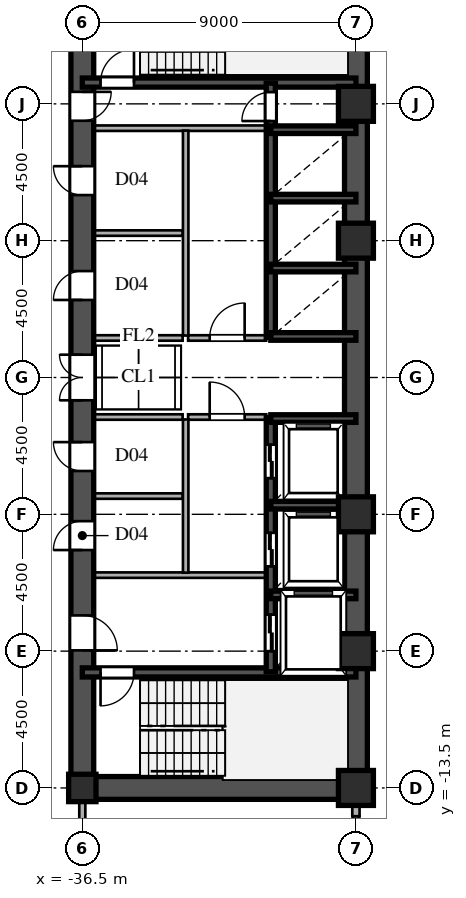
"""IFC4 building model, lengths in metres.
Left out: names, types, materials, properties, quantities, classifications, styles, units other than length and angle.
Written with IfcOpenShell. Run it as: python <this file> out.ifc"""

import sys

from ifc_helpers import new_model, si_unit, direction, frame, frame_2d, origin, origin_2d, place, context, subcontext, project, spatial, rectangle, hollow_rectangle, i_section, extrude, source, transform, mapped, element, fill, save


model = new_model("IFC4")
c1 = context("Model", 3, precision=1e-05, world=origin(), true_north=direction((0.0, 1.0)))
c2 = subcontext(c1, "Body", "Model", "MODEL_VIEW")
j1 = project(units=[si_unit("LENGTHUNIT", "METRE"), si_unit("PLANEANGLEUNIT", "RADIAN")], contexts=[c1])
p1 = place(None, origin())
s1 = spatial("IfcSite", under=j1, at=p1, CompositionType="ELEMENT")
p2 = place(p1, origin())
s2 = spatial("IfcBuilding", under=s1, at=p2, CompositionType="ELEMENT")
p3 = place(p2, frame((0.0, 0.0, 51.3)))
s3 = spatial("IfcBuildingStorey", under=s2, at=p3, CompositionType="ELEMENT", Elevation=51.3)
m1 = source(origin(), c2, "Body", "SweptSolid", [
    extrude(hollow_rectangle(XDim=1.15, YDim=1.15, WallThickness=0.048, at=origin_2d()), origin(), (0.0, 0.0, 1.0), 3.6),
])
for number, where, z_axis, x_axis in (
    (1, (-27.5, -13.5, 0.0), (0.0, 0.0, 1.0), (1.0, 0.0, 0.0)),
    (2, (-27.5, -9.0, 0.0), (0.0, 0.0, 1.0), (1.0, 0.0, 0.0)),
    (3, (-27.5, -4.5, 0.0), (0.0, 0.0, 1.0), (1.0, 0.0, 0.0)),
    (4, (-27.5, 4.5, 0.0), (0.0, 0.0, 1.0), (1.0, 0.0, 0.0)),
    (5, (-27.5, 9.0, 0.0), (0.0, 0.0, 1.0), (1.0, 0.0, 0.0)),
):
    element("IfcColumn", number, at=place(p3, frame(where, z_axis=z_axis, x_axis=x_axis)), inside=s3, PredefinedType="COLUMN", context=c2, shape_type="MappedRepresentation", body=[
        mapped(m1, transform((0.0, 0.0, 0.0), scale=1.0)),
    ])
m2 = source(origin(), c2, "Body", "SweptSolid", [
    extrude(i_section(OverallWidth=0.9, OverallDepth=0.9, WebThickness=0.036, FlangeThickness=0.055, at=origin_2d()), origin(), (0.0, 0.0, 1.0), 3.6),
])
p4 = place(p3, frame((-36.5, -13.5, 0.0), z_axis=(0.0, 0.0, 1.0), x_axis=(1.0, 0.0, 0.0)))
e6 = element("IfcColumn", 6, at=p4, inside=s3, PredefinedType="COLUMN", context=c2, shape_type="MappedRepresentation", body=[
    mapped(m2, transform((0.0, 0.0, 0.0), scale=1.0)),
])
p5 = place(p3, frame((-27.5, -14.43, 0.0), z_axis=(0.0, 0.0, 1.0), x_axis=(0.0, 1.0, 0.0)))
e7 = element("IfcWall", 7, at=p5, inside=s3, PredefinedType="SOLIDWALL", context=c2, shape_type="SweptSolid", body=[
    extrude(rectangle(XDim=0.55, YDim=0.24, at=frame_2d((0.275, 0.0))), origin(), (0.0, 0.0, 1.0), 2.88),
])
for number, where, z_axis, x_axis in (
    (8, (-27.5, -13.5, 0.0), (0.0, 0.0, 1.0), (0.0, 1.0, 0.0)),
    (9, (-27.5, 1.3, 0.0), (0.0, 0.0, 1.0), (0.0, 1.0, 0.0)),
):
    element("IfcWall", number, at=place(p3, frame(where, z_axis=z_axis, x_axis=x_axis)), inside=s3, PredefinedType="SHEAR", context=c2, shape_type="SweptSolid", body=[
        extrude(rectangle(XDim=12.2, YDim=0.75, at=frame_2d((6.1, 0.0))), origin(), (0.0, 0.0, 1.0), 3.38),
    ])
p6 = place(p3, frame((-27.5, -1.3, 0.0), z_axis=(0.0, 0.0, 1.0), x_axis=(0.0, 1.0, 0.0)))
e10 = element("IfcWall", 10, at=p6, inside=s3, PredefinedType="SHEAR", context=c2, shape_type="SweptSolid", body=[
    extrude(rectangle(XDim=2.6, YDim=0.75, at=frame_2d((1.3, 0.0))), origin(), (0.0, 0.0, 1.0), 3.38),
])
p7 = place(p3, frame((-36.5, -13.5, 0.0), z_axis=(0.0, 0.0, 1.0), x_axis=(1.0, 0.0, 0.0)))
e11 = element("IfcWall", 11, at=p7, inside=s3, PredefinedType="SHEAR", context=c2, shape_type="SweptSolid", body=[
    extrude(rectangle(XDim=9.0, YDim=0.75, at=frame_2d((4.5, 0.0))), origin(), (0.0, 0.0, 1.0), 3.38),
])
p8 = place(p3, frame((-36.5, -13.65, 0.0), z_axis=(0.0, 0.0, 1.0), x_axis=(0.0, 1.0, 0.0)))
e12 = element("IfcWall", 12, at=p8, inside=s3, PredefinedType="SHEAR", context=c2, shape_type="SweptSolid", body=[
    extrude(rectangle(XDim=7.15, YDim=0.75, at=frame_2d((3.575, 0.0))), origin(), (0.0, 0.0, 1.0), 3.38),
])
p9 = place(p8, frame((4.675, 0.0, 0.0)))
e13 = element("IfcOpeningElement", 13, at=p9, cuts=e12, PredefinedType="OPENING", context=c2, shape_type="SweptSolid", body=[
    extrude(rectangle(XDim=1.15, YDim=2.2, at=frame_2d((0.575, 1.1))), frame((0.0, 0.385, 0.0), z_axis=(0.0, -1.0, 0.0), x_axis=(1.0, 0.0, 0.0)), (0.0, 0.0, 1.0), 0.77),
])
p10 = place(p3, frame((-36.5, -1.3, 0.0), z_axis=(0.0, 0.0, 1.0), x_axis=(0.0, 1.0, 0.0)))
e14 = element("IfcWall", 14, at=p10, inside=s3, PredefinedType="SHEAR", context=c2, shape_type="SweptSolid", body=[
    extrude(rectangle(XDim=2.6, YDim=0.75, at=frame_2d((1.3, 0.0))), origin(), (0.0, 0.0, 1.0), 3.38),
])
p11 = place(p10, frame((0.55, 0.0, 0.0)))
e15 = element("IfcOpeningElement", 15, at=p11, cuts=e14, PredefinedType="OPENING", context=c2, shape_type="SweptSolid", body=[
    extrude(rectangle(XDim=1.5, YDim=2.3, at=frame_2d((0.75, 1.15))), frame((0.0, 0.385, 0.0), z_axis=(0.0, -1.0, 0.0), x_axis=(1.0, 0.0, 0.0)), (0.0, 0.0, 1.0), 0.77),
])
p12 = place(p3, frame((-36.5, 8.2, 0.0), z_axis=(0.0, 0.0, 1.0), x_axis=(0.0, 1.0, 0.0)))
e16 = element("IfcWall", 16, at=p12, inside=s3, PredefinedType="SHEAR", context=c2, shape_type="SweptSolid", body=[
    extrude(rectangle(XDim=5.45, YDim=0.75, at=frame_2d((2.725, 0.0))), origin(), (0.0, 0.0, 1.0), 3.38),
])
p13 = place(p12, frame((0.245, 0.0, 0.0)))
e17 = element("IfcOpeningElement", 17, at=p13, cuts=e16, PredefinedType="OPENING", context=c2, shape_type="SweptSolid", body=[
    extrude(rectangle(XDim=0.95, YDim=2.15, at=frame_2d((0.475, 1.075))), frame((0.0, 0.385, 0.0), z_axis=(0.0, -1.0, 0.0), x_axis=(1.0, 0.0, 0.0)), (0.0, 0.0, 1.0), 0.77),
])
p14 = place(p3, frame((-36.5, -6.5, 0.0), z_axis=(0.0, 0.0, 1.0), x_axis=(0.0, 1.0, 0.0)))
e18 = element("IfcWall", 18, at=p14, inside=s3, PredefinedType="SHEAR", context=c2, shape_type="SweptSolid", body=[
    extrude(rectangle(XDim=2.6, YDim=0.75, at=frame_2d((1.3, 0.0))), origin(), (0.0, 0.0, 1.0), 3.38),
])
p15 = place(p14, frame((0.825, 0.0, 0.0)))
e19 = element("IfcOpeningElement", 19, at=p15, cuts=e18, PredefinedType="OPENING", context=c2, shape_type="SweptSolid", body=[
    extrude(rectangle(XDim=0.95, YDim=2.15, at=frame_2d((0.475, 1.075))), frame((0.0, 0.385, 0.0), z_axis=(0.0, -1.0, 0.0), x_axis=(1.0, 0.0, 0.0)), (0.0, 0.0, 1.0), 0.77),
])
p16 = place(p3, frame((-36.5, -3.9, 0.0), z_axis=(0.0, 0.0, 1.0), x_axis=(0.0, 1.0, 0.0)))
e20 = element("IfcWall", 20, at=p16, inside=s3, PredefinedType="SHEAR", context=c2, shape_type="SweptSolid", body=[
    extrude(rectangle(XDim=2.6, YDim=0.75, at=frame_2d((1.3, 0.0))), origin(), (0.0, 0.0, 1.0), 3.38),
])
p17 = place(p16, frame((0.825, 0.0, 0.0)))
e21 = element("IfcOpeningElement", 21, at=p17, cuts=e20, PredefinedType="OPENING", context=c2, shape_type="SweptSolid", body=[
    extrude(rectangle(XDim=0.95, YDim=2.15, at=frame_2d((0.475, 1.075))), frame((0.0, 0.385, 0.0), z_axis=(0.0, -1.0, 0.0), x_axis=(1.0, 0.0, 0.0)), (0.0, 0.0, 1.0), 0.77),
])
p18 = place(p3, frame((-36.5, 1.3, 0.0), z_axis=(0.0, 0.0, 1.0), x_axis=(0.0, 1.0, 0.0)))
e22 = element("IfcWall", 22, at=p18, inside=s3, PredefinedType="SHEAR", context=c2, shape_type="SweptSolid", body=[
    extrude(rectangle(XDim=3.45, YDim=0.75, at=frame_2d((1.725, 0.0))), origin(), (0.0, 0.0, 1.0), 3.38),
])
p19 = place(p18, frame((1.25, 0.0, 0.0)))
e23 = element("IfcOpeningElement", 23, at=p19, cuts=e22, PredefinedType="OPENING", context=c2, shape_type="SweptSolid", body=[
    extrude(rectangle(XDim=0.95, YDim=2.15, at=frame_2d((0.475, 1.075))), frame((0.0, 0.385, 0.0), z_axis=(0.0, -1.0, 0.0), x_axis=(1.0, 0.0, 0.0)), (0.0, 0.0, 1.0), 0.77),
])
p20 = place(p3, frame((-36.5, 4.75, 0.0), z_axis=(0.0, 0.0, 1.0), x_axis=(0.0, 1.0, 0.0)))
e24 = element("IfcWall", 24, at=p20, inside=s3, PredefinedType="SHEAR", context=c2, shape_type="SweptSolid", body=[
    extrude(rectangle(XDim=3.45, YDim=0.75, at=frame_2d((1.725, 0.0))), origin(), (0.0, 0.0, 1.0), 3.38),
])
p21 = place(p20, frame((1.25, 0.0, 0.0)))
e25 = element("IfcOpeningElement", 25, at=p21, cuts=e24, PredefinedType="OPENING", context=c2, shape_type="SweptSolid", body=[
    extrude(rectangle(XDim=0.95, YDim=2.15, at=frame_2d((0.475, 1.075))), frame((0.0, 0.385, 0.0), z_axis=(0.0, -1.0, 0.0), x_axis=(1.0, 0.0, 0.0)), (0.0, 0.0, 1.0), 0.77),
])
p22 = place(p3, frame((-36.5, -9.7, 0.0), z_axis=(0.0, 0.0, 1.0), x_axis=(1.0, 0.0, 0.0)))
e26 = element("IfcWall", 26, at=p22, inside=s3, PredefinedType="SHEAR", context=c2, shape_type="SweptSolid", body=[
    extrude(rectangle(XDim=9.0, YDim=0.3, at=frame_2d((4.5, 0.0))), origin(), (0.0, 0.0, 1.0), 3.38),
])
p23 = place(p22, frame((0.6, 0.0, 0.0)))
e27 = element("IfcOpeningElement", 27, at=p23, cuts=e26, PredefinedType="OPENING", context=c2, shape_type="SweptSolid", body=[
    extrude(rectangle(XDim=1.1, YDim=2.2, at=frame_2d((0.55, 1.1))), frame((0.0, 0.16, 0.0), z_axis=(0.0, -1.0, 0.0), x_axis=(1.0, 0.0, 0.0)), (0.0, 0.0, 1.0), 0.32),
])
p24 = place(p3, frame((-36.5, 9.7, 0.0), z_axis=(0.0, 0.0, 1.0), x_axis=(1.0, 0.0, 0.0)))
e28 = element("IfcWall", 28, at=p24, inside=s3, PredefinedType="SHEAR", context=c2, shape_type="SweptSolid", body=[
    extrude(rectangle(XDim=9.0, YDim=0.3, at=frame_2d((4.5, 0.0))), origin(), (0.0, 0.0, 1.0), 3.38),
])
p25 = place(p24, frame((0.6, 0.0, 0.0)))
e29 = element("IfcOpeningElement", 29, at=p25, cuts=e28, PredefinedType="OPENING", context=c2, shape_type="SweptSolid", body=[
    extrude(rectangle(XDim=1.1, YDim=2.2, at=frame_2d((0.55, 1.1))), frame((0.0, 0.16, 0.0), z_axis=(0.0, -1.0, 0.0), x_axis=(1.0, 0.0, 0.0)), (0.0, 0.0, 1.0), 0.32),
])
for number, where, z_axis, x_axis in (
    (30, (-30.3, -7.15, 0.0), (0.0, 0.0, 1.0), (1.0, 0.0, 0.0)),
    (31, (-30.3, -4.2, 0.0), (0.0, 0.0, 1.0), (1.0, 0.0, 0.0)),
    (32, (-30.3, -1.35, 0.0), (0.0, 0.0, 1.0), (1.0, 0.0, 0.0)),
    (33, (-30.3, 1.35, 0.0), (0.0, 0.0, 1.0), (1.0, 0.0, 0.0)),
    (34, (-30.3, 3.6, 0.0), (0.0, 0.0, 1.0), (1.0, 0.0, 0.0)),
    (35, (-30.3, 5.9, 0.0), (0.0, 0.0, 1.0), (1.0, 0.0, 0.0)),
    (36, (-30.3, 8.15, 0.0), (0.0, 0.0, 1.0), (1.0, 0.0, 0.0)),
):
    element("IfcWall", number, at=place(p3, frame(where, z_axis=z_axis, x_axis=x_axis)), inside=s3, PredefinedType="SHEAR", context=c2, shape_type="SweptSolid", body=[
        extrude(rectangle(XDim=2.8, YDim=0.25, at=frame_2d((1.4, 0.0))), origin(), (0.0, 0.0, 1.0), 3.38),
    ])
p26 = place(p3, frame((-30.3, -9.68, 0.0), z_axis=(0.0, 0.0, 1.0), x_axis=(0.0, 1.0, 0.0)))
e37 = element("IfcWall", 37, at=p26, inside=s3, PredefinedType="SHEAR", context=c2, shape_type="SweptSolid", body=[
    extrude(rectangle(XDim=2.56, YDim=0.3, at=frame_2d((1.28, 0.0))), origin(), (0.0, 0.0, 1.0), 3.38),
])
p27 = place(p26, frame((0.68, 0.0, 0.0)))
e38 = element("IfcOpeningElement", 38, at=p27, cuts=e37, PredefinedType="OPENING", context=c2, shape_type="SweptSolid", body=[
    extrude(rectangle(XDim=1.2, YDim=2.25, at=frame_2d((0.6, 1.125))), frame((0.0, 0.16, 0.0), z_axis=(0.0, -1.0, 0.0), x_axis=(1.0, 0.0, 0.0)), (0.0, 0.0, 1.0), 0.32),
])
p28 = place(p3, frame((-30.3, -7.12, 0.0), z_axis=(0.0, 0.0, 1.0), x_axis=(0.0, 1.0, 0.0)))
e39 = element("IfcWall", 39, at=p28, inside=s3, PredefinedType="SHEAR", context=c2, shape_type="SweptSolid", body=[
    extrude(rectangle(XDim=2.92, YDim=0.3, at=frame_2d((1.46, 0.0))), origin(), (0.0, 0.0, 1.0), 3.38),
])
p29 = place(p28, frame((0.91, 0.0, 0.0)))
e40 = element("IfcOpeningElement", 40, at=p29, cuts=e39, PredefinedType="OPENING", context=c2, shape_type="SweptSolid", body=[
    extrude(rectangle(XDim=1.1, YDim=2.2, at=frame_2d((0.55, 1.1))), frame((0.0, 0.16, 0.0), z_axis=(0.0, -1.0, 0.0), x_axis=(1.0, 0.0, 0.0)), (0.0, 0.0, 1.0), 0.32),
])
p30 = place(p3, frame((-30.3, -4.2, 0.0), z_axis=(0.0, 0.0, 1.0), x_axis=(0.0, 1.0, 0.0)))
e41 = element("IfcWall", 41, at=p30, inside=s3, PredefinedType="SHEAR", context=c2, shape_type="SweptSolid", body=[
    extrude(rectangle(XDim=2.88, YDim=0.3, at=frame_2d((1.44, 0.0))), origin(), (0.0, 0.0, 1.0), 3.38),
])
p31 = place(p30, frame((0.89, 0.0, 0.0)))
e42 = element("IfcOpeningElement", 42, at=p31, cuts=e41, PredefinedType="OPENING", context=c2, shape_type="SweptSolid", body=[
    extrude(rectangle(XDim=1.1, YDim=2.2, at=frame_2d((0.55, 1.1))), frame((0.0, 0.16, 0.0), z_axis=(0.0, -1.0, 0.0), x_axis=(1.0, 0.0, 0.0)), (0.0, 0.0, 1.0), 0.32),
])
p32 = place(p3, frame((-30.3, 1.32, 0.0), z_axis=(0.0, 0.0, 1.0), x_axis=(0.0, 1.0, 0.0)))
e43 = element("IfcWall", 43, at=p32, inside=s3, PredefinedType="SHEAR", context=c2, shape_type="SweptSolid", body=[
    extrude(rectangle(XDim=2.28, YDim=0.3, at=frame_2d((1.14, 0.0))), origin(), (0.0, 0.0, 1.0), 3.38),
])
p33 = place(p3, frame((-30.3, 3.6, 0.0), z_axis=(0.0, 0.0, 1.0), x_axis=(0.0, 1.0, 0.0)))
e44 = element("IfcWall", 44, at=p33, inside=s3, PredefinedType="SHEAR", context=c2, shape_type="SweptSolid", body=[
    extrude(rectangle(XDim=2.3, YDim=0.3, at=frame_2d((1.15, 0.0))), origin(), (0.0, 0.0, 1.0), 3.38),
])
p34 = place(p3, frame((-30.3, 5.9, 0.0), z_axis=(0.0, 0.0, 1.0), x_axis=(0.0, 1.0, 0.0)))
e45 = element("IfcWall", 45, at=p34, inside=s3, PredefinedType="SHEAR", context=c2, shape_type="SweptSolid", body=[
    extrude(rectangle(XDim=2.25, YDim=0.3, at=frame_2d((1.125, 0.0))), origin(), (0.0, 0.0, 1.0), 3.38),
])
p35 = place(p3, frame((-30.3, 8.15, 0.0), z_axis=(0.0, 0.0, 1.0), x_axis=(0.0, 1.0, 0.0)))
e46 = element("IfcWall", 46, at=p35, inside=s3, PredefinedType="SHEAR", context=c2, shape_type="SweptSolid", body=[
    extrude(rectangle(XDim=1.53, YDim=0.3, at=frame_2d((0.765, 0.0))), origin(), (0.0, 0.0, 1.0), 3.38),
])
p36 = place(p35, frame((0.285, 0.0, 0.0)))
e47 = element("IfcOpeningElement", 47, at=p36, cuts=e46, PredefinedType="OPENING", context=c2, shape_type="SweptSolid", body=[
    extrude(rectangle(XDim=0.95, YDim=2.15, at=frame_2d((0.475, 1.075))), frame((0.0, 0.16, 0.0), z_axis=(0.0, -1.0, 0.0), x_axis=(1.0, 0.0, 0.0)), (0.0, 0.0, 1.0), 0.32),
])
for number, where, z_axis, x_axis in (
    (48, (-36.15, -6.5, 0.0), (0.0, 0.0, 1.0), (1.0, 0.0, 0.0)),
    (49, (-36.15, 8.2, 0.0), (0.0, 0.0, 1.0), (1.0, 0.0, 0.0)),
):
    element("IfcWall", number, at=place(p3, frame(where, z_axis=z_axis, x_axis=x_axis)), inside=s3, PredefinedType="PARTITIONING", context=c2, shape_type="SweptSolid", body=[
        extrude(rectangle(XDim=5.7, YDim=0.18, at=frame_2d((2.85, 0.0))), origin(), (0.0, 0.0, 1.0), 3.38),
    ])
p37 = place(p3, frame((-33.1, -6.42, 0.0), z_axis=(0.0, 0.0, 1.0), x_axis=(0.0, 1.0, 0.0)))
e50 = element("IfcWall", 50, at=p37, inside=s3, PredefinedType="PARTITIONING", context=c2, shape_type="SweptSolid", body=[
    extrude(rectangle(XDim=5.04, YDim=0.18, at=frame_2d((2.52, 0.0))), origin(), (0.0, 0.0, 1.0), 3.38),
])
p38 = place(p3, frame((-33.1, 1.38, 0.0), z_axis=(0.0, 0.0, 1.0), x_axis=(0.0, 1.0, 0.0)))
e51 = element("IfcWall", 51, at=p38, inside=s3, PredefinedType="PARTITIONING", context=c2, shape_type="SweptSolid", body=[
    extrude(rectangle(XDim=6.74, YDim=0.18, at=frame_2d((3.37, 0.0))), origin(), (0.0, 0.0, 1.0), 3.38),
])
p39 = place(p3, frame((-33.02, -1.3, 0.0), z_axis=(0.0, 0.0, 1.0), x_axis=(1.0, 0.0, 0.0)))
e52 = element("IfcWall", 52, at=p39, inside=s3, PredefinedType="PARTITIONING", context=c2, shape_type="SweptSolid", body=[
    extrude(rectangle(XDim=2.57, YDim=0.18, at=frame_2d((1.285, 0.0))), origin(), (0.0, 0.0, 1.0), 3.38),
])
p40 = place(p39, frame((0.71, 0.0, 0.0)))
e53 = element("IfcOpeningElement", 53, at=p40, cuts=e52, PredefinedType="OPENING", context=c2, shape_type="SweptSolid", body=[
    extrude(rectangle(XDim=1.15, YDim=2.2, at=frame_2d((0.575, 1.1))), frame((0.0, 0.1, 0.0), z_axis=(0.0, -1.0, 0.0), x_axis=(1.0, 0.0, 0.0)), (0.0, 0.0, 1.0), 0.2),
])
p41 = place(p3, frame((-33.02, 1.3, 0.0), z_axis=(0.0, 0.0, 1.0), x_axis=(1.0, 0.0, 0.0)))
e54 = element("IfcWall", 54, at=p41, inside=s3, PredefinedType="PARTITIONING", context=c2, shape_type="SweptSolid", body=[
    extrude(rectangle(XDim=2.57, YDim=0.18, at=frame_2d((1.285, 0.0))), origin(), (0.0, 0.0, 1.0), 3.38),
])
p42 = place(p41, frame((0.71, 0.0, 0.0)))
e55 = element("IfcOpeningElement", 55, at=p42, cuts=e54, PredefinedType="OPENING", context=c2, shape_type="SweptSolid", body=[
    extrude(rectangle(XDim=1.15, YDim=2.2, at=frame_2d((0.575, 1.1))), frame((0.0, 0.1, 0.0), z_axis=(0.0, -1.0, 0.0), x_axis=(1.0, 0.0, 0.0)), (0.0, 0.0, 1.0), 0.2),
])
for number, where, z_axis, x_axis in (
    (56, (-36.15, -1.3, 0.0), (0.0, 0.0, 1.0), (1.0, 0.0, 0.0)),
    (57, (-36.15, 1.3, 0.0), (0.0, 0.0, 1.0), (1.0, 0.0, 0.0)),
    (58, (-36.15, -3.9, 0.0), (0.0, 0.0, 1.0), (1.0, 0.0, 0.0)),
    (59, (-36.15, 4.75, 0.0), (0.0, 0.0, 1.0), (1.0, 0.0, 0.0)),
):
    element("IfcWall", number, at=place(p3, frame(where, z_axis=z_axis, x_axis=x_axis)), inside=s3, PredefinedType="PARTITIONING", context=c2, shape_type="SweptSolid", body=[
        extrude(rectangle(XDim=2.95, YDim=0.18, at=frame_2d((1.475, 0.0))), origin(), (0.0, 0.0, 1.0), 3.38),
    ])
p43 = place(p3, frame((-36.5, -15.515, 0.0), z_axis=(0.0, 0.0, 1.0), x_axis=(0.0, 1.0, 0.0)))
e60 = element("IfcWall", 60, at=p43, inside=s3, PredefinedType="PARTITIONING", context=c2, shape_type="SweptSolid", body=[
    extrude(rectangle(XDim=1.635, YDim=0.2, at=frame_2d((0.817, 0.0))), origin(), (0.0, 0.0, 1.0), 2.68),
])
m3 = source(origin(), c2, "Body", "SweptSolid", [
    extrude(rectangle(XDim=1.15, YDim=2.2, at=frame_2d((0.575, 1.1))), frame((0.0, 0.025, 0.0), z_axis=(0.0, -1.0, 0.0), x_axis=(1.0, 0.0, 0.0)), (0.0, 0.0, 1.0), 0.05),
])
p44 = place(p9, frame((1.15, 0.0, 0.0), z_axis=(0.0, 0.0, 1.0), x_axis=(-1.0, 0.0, 0.0)))
e61 = element("IfcDoor", 61, at=p44, inside=s3, OperationType="SINGLE_SWING_LEFT", PredefinedType="DOOR", context=c2, shape_type="MappedRepresentation", body=[
    mapped(m3, transform((0.0, 0.0, 0.0), scale=1.0)),
])
fill(e13, e61)
m4 = source(origin(), c2, "Body", "SweptSolid", [
    extrude(rectangle(XDim=1.5, YDim=2.3, at=frame_2d((0.75, 1.15))), frame((0.0, 0.025, 0.0), z_axis=(0.0, -1.0, 0.0), x_axis=(1.0, 0.0, 0.0)), (0.0, 0.0, 1.0), 0.05),
])
p45 = place(p11, origin())
e62 = element("IfcDoor", 62, at=p45, inside=s3, OperationType="DOUBLE_SWING_LEFT", PredefinedType="DOOR", context=c2, shape_type="MappedRepresentation", body=[
    mapped(m4, transform((0.0, 0.0, 0.0), scale=1.0)),
])
fill(e15, e62)
m5 = source(origin(), c2, "Body", "SweptSolid", [
    extrude(rectangle(XDim=0.95, YDim=2.15, at=frame_2d((0.475, 1.075))), frame((0.0, 0.025, 0.0), z_axis=(0.0, -1.0, 0.0), x_axis=(1.0, 0.0, 0.0)), (0.0, 0.0, 1.0), 0.05),
])
p46 = place(p13, frame((0.95, 0.0, 0.0), z_axis=(0.0, 0.0, 1.0), x_axis=(-1.0, 0.0, 0.0)))
e63 = element("IfcDoor", 63, at=p46, inside=s3, OperationType="SINGLE_SWING_RIGHT", PredefinedType="DOOR", context=c2, shape_type="MappedRepresentation", body=[
    mapped(m5, transform((0.0, 0.0, 0.0), scale=1.0)),
])
fill(e17, e63)
p47 = place(p15, origin())
e64 = element("IfcDoor", 64, at=p47, inside=s3, OperationType="SINGLE_SWING_LEFT", PredefinedType="DOOR", context=c2, shape_type="MappedRepresentation", body=[
    mapped(m5, transform((0.0, 0.0, 0.0), scale=1.0)),
])
fill(e19, e64)
p48 = place(p17, origin())
e65 = element("IfcDoor", 65, at=p48, inside=s3, OperationType="SINGLE_SWING_RIGHT", PredefinedType="DOOR", context=c2, shape_type="MappedRepresentation", body=[
    mapped(m5, transform((0.0, 0.0, 0.0), scale=1.0)),
])
fill(e21, e65)
p49 = place(p19, origin())
e66 = element("IfcDoor", 66, at=p49, inside=s3, OperationType="SINGLE_SWING_LEFT", PredefinedType="DOOR", context=c2, shape_type="MappedRepresentation", body=[
    mapped(m5, transform((0.0, 0.0, 0.0), scale=1.0)),
])
fill(e23, e66)
p50 = place(p21, origin())
e67 = element("IfcDoor", 67, at=p50, inside=s3, OperationType="SINGLE_SWING_RIGHT", PredefinedType="DOOR", context=c2, shape_type="MappedRepresentation", body=[
    mapped(m5, transform((0.0, 0.0, 0.0), scale=1.0)),
])
fill(e25, e67)
m6 = source(origin(), c2, "Body", "SweptSolid", [
    extrude(rectangle(XDim=1.1, YDim=2.2, at=frame_2d((0.55, 1.1))), frame((0.0, 0.025, 0.0), z_axis=(0.0, -1.0, 0.0), x_axis=(1.0, 0.0, 0.0)), (0.0, 0.0, 1.0), 0.05),
])
p51 = place(p23, frame((1.1, 0.0, 0.0), z_axis=(0.0, 0.0, 1.0), x_axis=(-1.0, 0.0, 0.0)))
e68 = element("IfcDoor", 68, at=p51, inside=s3, OperationType="SINGLE_SWING_LEFT", PredefinedType="DOOR", context=c2, shape_type="MappedRepresentation", body=[
    mapped(m6, transform((0.0, 0.0, 0.0), scale=1.0)),
])
fill(e27, e68)
p52 = place(p25, origin())
e69 = element("IfcDoor", 69, at=p52, inside=s3, OperationType="SINGLE_SWING_RIGHT", PredefinedType="DOOR", context=c2, shape_type="MappedRepresentation", body=[
    mapped(m6, transform((0.0, 0.0, 0.0), scale=1.0)),
])
fill(e29, e69)
m7 = source(origin(), c2, "Body", "SweptSolid", [
    extrude(rectangle(XDim=1.2, YDim=2.25, at=frame_2d((0.6, 1.125))), frame((0.0, 0.025, 0.0), z_axis=(0.0, -1.0, 0.0), x_axis=(1.0, 0.0, 0.0)), (0.0, 0.0, 1.0), 0.05),
])
p53 = place(p27, origin())
e70 = element("IfcDoor", 70, at=p53, inside=s3, OperationType="DOUBLE_DOOR_SLIDING", PredefinedType="DOOR", context=c2, shape_type="MappedRepresentation", body=[
    mapped(m7, transform((0.0, 0.0, 0.0), scale=1.0)),
])
fill(e38, e70)
m8 = source(origin(), c2, "Body", "SweptSolid", [
    extrude(rectangle(XDim=1.1, YDim=2.2, at=frame_2d((0.55, 1.1))), frame((0.0, 0.025, 0.0), z_axis=(0.0, -1.0, 0.0), x_axis=(1.0, 0.0, 0.0)), (0.0, 0.0, 1.0), 0.05),
])
p54 = place(p29, origin())
e71 = element("IfcDoor", 71, at=p54, inside=s3, OperationType="DOUBLE_DOOR_SLIDING", PredefinedType="DOOR", context=c2, shape_type="MappedRepresentation", body=[
    mapped(m8, transform((0.0, 0.0, 0.0), scale=1.0)),
])
fill(e40, e71)
p55 = place(p31, origin())
e72 = element("IfcDoor", 72, at=p55, inside=s3, OperationType="DOUBLE_DOOR_SLIDING", PredefinedType="DOOR", context=c2, shape_type="MappedRepresentation", body=[
    mapped(m8, transform((0.0, 0.0, 0.0), scale=1.0)),
])
fill(e42, e72)
p56 = place(p36, origin())
e73 = element("IfcDoor", 73, at=p56, inside=s3, OperationType="SINGLE_SWING_LEFT", PredefinedType="DOOR", context=c2, shape_type="MappedRepresentation", body=[
    mapped(m5, transform((0.0, 0.0, 0.0), scale=1.0)),
])
fill(e47, e73)
p57 = place(p40, origin())
e74 = element("IfcDoor", 74, at=p57, inside=s3, OperationType="SINGLE_SWING_LEFT", PredefinedType="DOOR", context=c2, shape_type="MappedRepresentation", body=[
    mapped(m3, transform((0.0, 0.0, 0.0), scale=1.0)),
])
fill(e53, e74)
p58 = place(p42, origin())
e75 = element("IfcDoor", 75, at=p58, inside=s3, OperationType="SINGLE_SWING_RIGHT", PredefinedType="DOOR", context=c2, shape_type="MappedRepresentation", body=[
    mapped(m3, transform((0.0, 0.0, 0.0), scale=1.0)),
])
fill(e55, e75)
save(model, sys.argv[1])
